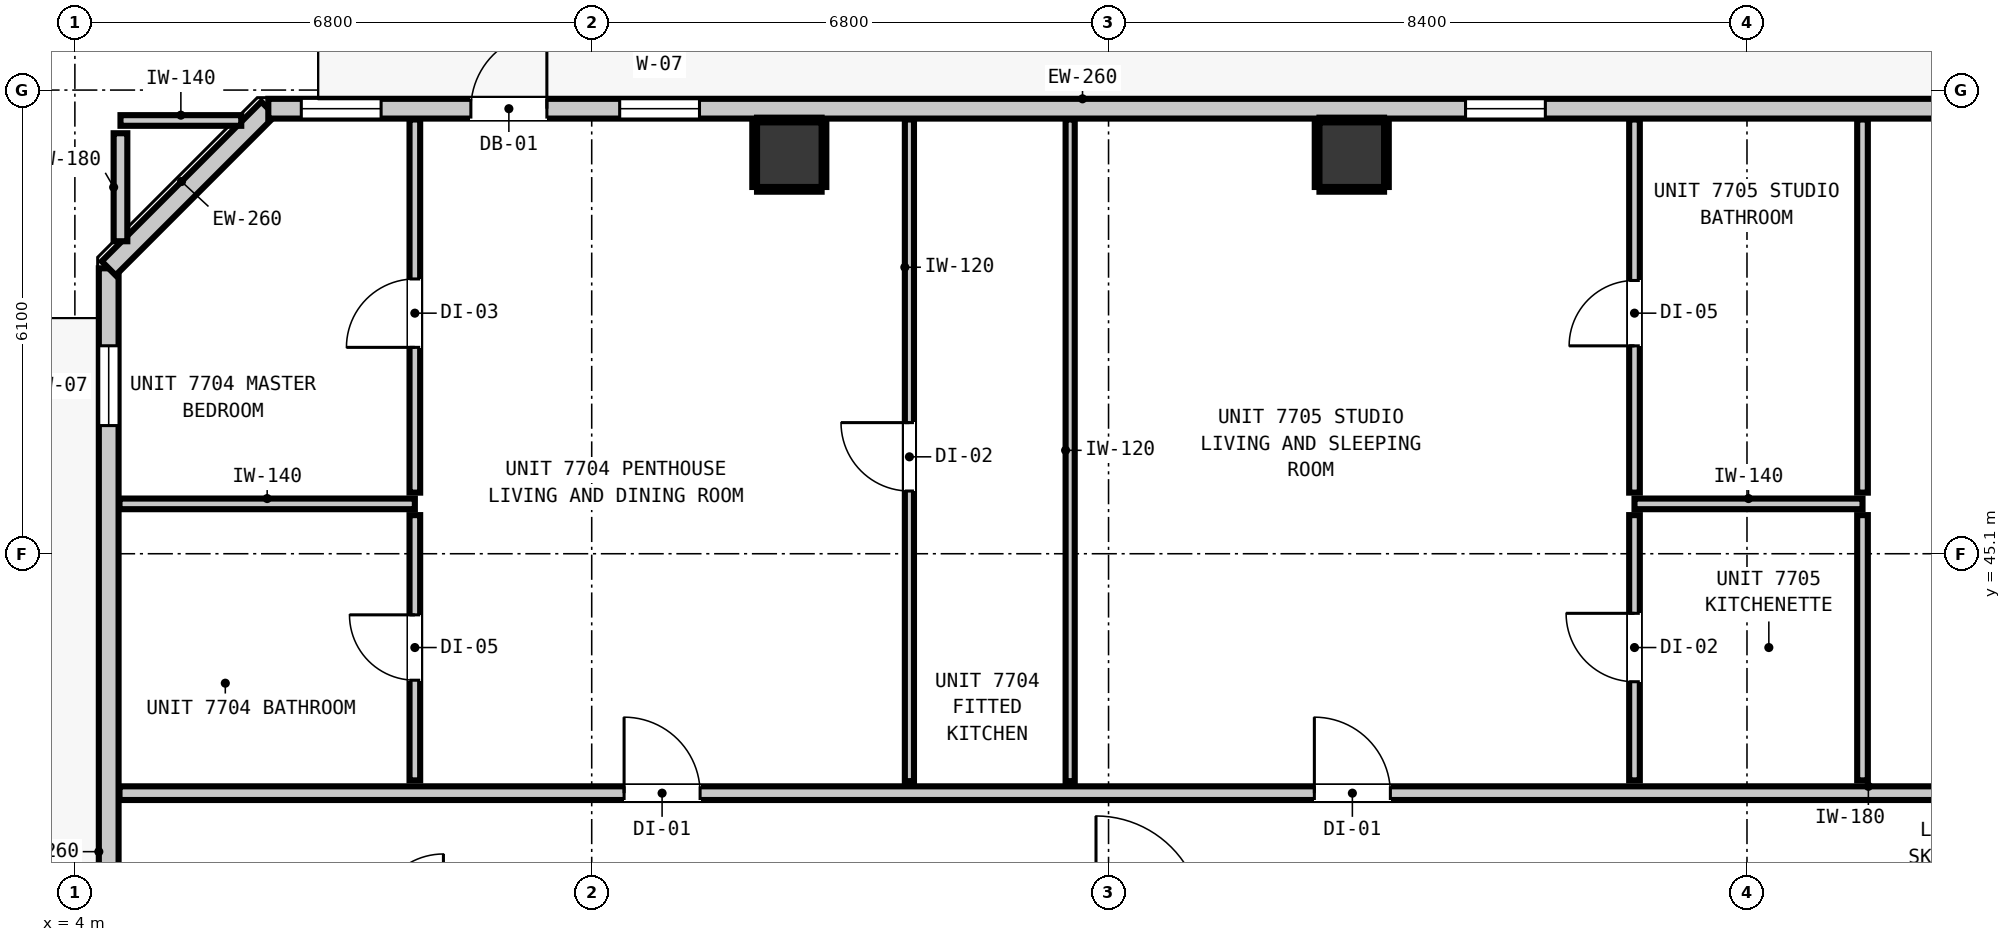
"""IFC4 building model, lengths in metres.
Left out: names, types, materials, properties, quantities, classifications, styles, units other than length and angle.
Written with IfcOpenShell. Run it as: python <this file> out.ifc"""

import sys

from ifc_helpers import new_model, si_unit, direction, frame, frame_2d, origin, origin_2d, place, context, subcontext, project, spatial, rectangle, extrude, element, fill, save


model = new_model("IFC4")
c1 = context("Model", 3, precision=1e-05, world=origin(), true_north=direction((0.0, 1.0)))
c2 = subcontext(c1, "Body", "Model", "MODEL_VIEW")
j1 = project(units=[si_unit("LENGTHUNIT", "METRE"), si_unit("PLANEANGLEUNIT", "RADIAN")], contexts=[c1])
p1 = place(None, origin())
s1 = spatial("IfcSite", under=j1, at=p1, CompositionType="ELEMENT")
p2 = place(p1, origin())
s2 = spatial("IfcBuilding", under=s1, at=p2, CompositionType="ELEMENT")
p3 = place(p2, frame((0.0, 0.0, 265.56)))
s3 = spatial("IfcBuildingStorey", under=s2, at=p3, CompositionType="ELEMENT", Elevation=265.56)
for number, where, z_axis, x_axis in (
    (1, (13.4, 50.35, 0.0), (0.0, 0.0, 1.0), (1.0, 0.0, 0.0)),
    (2, (20.8, 50.35, 0.0), (0.0, 0.0, 1.0), (1.0, 0.0, 0.0)),
):
    element("IfcColumn", number, at=place(p3, frame(where, z_axis=z_axis, x_axis=x_axis)), inside=s3, PredefinedType="COLUMN", context=c2, shape_type="SweptSolid", body=[
        extrude(rectangle(XDim=0.85, YDim=0.85, at=origin_2d()), origin(), (0.0, 0.0, 1.0), 3.32),
    ])
p4 = place(p3, frame((4.445, 18.545, 0.0), z_axis=(0.0, 0.0, 1.0), x_axis=(0.0, 1.0, 0.0)))
e3 = element("IfcWall", 3, at=p4, inside=s3, PredefinedType="STANDARD", context=c2, shape_type="SweptSolid", body=[
    extrude(rectangle(XDim=30.31, YDim=0.26, at=frame_2d((15.155, 0.0))), origin(), (0.0, 0.0, 1.0), 3.1),
])
p5 = place(p4, frame((4.434, 0.0, 0.0)))
e4 = element("IfcOpeningElement", 4, at=p5, cuts=e3, PredefinedType="OPENING", context=c2, shape_type="SweptSolid", body=[
    extrude(rectangle(XDim=1.0, YDim=2.15, at=frame_2d((0.5, 1.075))), frame((0.0, 0.14, 0.0), z_axis=(0.0, -1.0, 0.0), x_axis=(1.0, 0.0, 0.0)), (0.0, 0.0, 1.0), 0.28),
])
p6 = place(p4, frame((28.241, 0.0, 0.85)))
e5 = element("IfcOpeningElement", 5, at=p6, cuts=e3, PredefinedType="OPENING", context=c2, shape_type="SweptSolid", body=[
    extrude(rectangle(XDim=1.05, YDim=1.65, at=frame_2d((0.525, 0.825))), frame((0.0, 0.14, 0.0), z_axis=(0.0, -1.0, 0.0), x_axis=(1.0, 0.0, 0.0)), (0.0, 0.0, 1.0), 0.28),
])
p7 = place(p4, frame((15.98, 0.0, 0.85)))
e6 = element("IfcOpeningElement", 6, at=p7, cuts=e3, PredefinedType="OPENING", context=c2, shape_type="SweptSolid", body=[
    extrude(rectangle(XDim=1.05, YDim=1.65, at=frame_2d((0.525, 0.825))), frame((0.0, 0.14, 0.0), z_axis=(0.0, -1.0, 0.0), x_axis=(1.0, 0.0, 0.0)), (0.0, 0.0, 1.0), 0.28),
])
p8 = place(p3, frame((4.445, 48.855, 0.0), z_axis=(0.0, 0.0, 1.0), x_axis=(0.707065676302, 0.707147883682, 0.0)))
e7 = element("IfcWall", 7, at=p8, inside=s3, PredefinedType="STANDARD", context=c2, shape_type="SweptSolid", body=[
    extrude(rectangle(XDim=2.97, YDim=0.26, at=frame_2d((1.485, 0.0))), origin(), (0.0, 0.0, 1.0), 3.1),
])
p9 = place(p3, frame((6.545, 50.955, 0.0), z_axis=(0.0, 0.0, 1.0), x_axis=(1.0, 0.0, 0.0)))
e8 = element("IfcWall", 8, at=p9, inside=s3, PredefinedType="STANDARD", context=c2, shape_type="SweptSolid", body=[
    extrude(rectangle(XDim=32.71, YDim=0.26, at=frame_2d((16.355, 0.0))), origin(), (0.0, 0.0, 1.0), 3.1),
])
p10 = place(p9, frame((2.665, 0.0, 0.0)))
e9 = element("IfcOpeningElement", 9, at=p10, cuts=e8, PredefinedType="OPENING", context=c2, shape_type="SweptSolid", body=[
    extrude(rectangle(XDim=1.0, YDim=2.15, at=frame_2d((0.5, 1.075))), frame((0.0, 0.14, 0.0), z_axis=(0.0, -1.0, 0.0), x_axis=(1.0, 0.0, 0.0)), (0.0, 0.0, 1.0), 0.28),
])
p11 = place(p9, frame((4.623, 0.0, 0.85)))
e10 = element("IfcOpeningElement", 10, at=p11, cuts=e8, PredefinedType="OPENING", context=c2, shape_type="SweptSolid", body=[
    extrude(rectangle(XDim=1.05, YDim=1.65, at=frame_2d((0.525, 0.825))), frame((0.0, 0.14, 0.0), z_axis=(0.0, -1.0, 0.0), x_axis=(1.0, 0.0, 0.0)), (0.0, 0.0, 1.0), 0.28),
])
p12 = place(p9, frame((0.434, 0.0, 0.85)))
e11 = element("IfcOpeningElement", 11, at=p12, cuts=e8, PredefinedType="OPENING", context=c2, shape_type="SweptSolid", body=[
    extrude(rectangle(XDim=1.05, YDim=1.65, at=frame_2d((0.525, 0.825))), frame((0.0, 0.14, 0.0), z_axis=(0.0, -1.0, 0.0), x_axis=(1.0, 0.0, 0.0)), (0.0, 0.0, 1.0), 0.28),
])
p13 = place(p9, frame((15.752, 0.0, 0.85)))
e12 = element("IfcOpeningElement", 12, at=p13, cuts=e8, PredefinedType="OPENING", context=c2, shape_type="SweptSolid", body=[
    extrude(rectangle(XDim=1.05, YDim=1.65, at=frame_2d((0.525, 0.825))), frame((0.0, 0.14, 0.0), z_axis=(0.0, -1.0, 0.0), x_axis=(1.0, 0.0, 0.0)), (0.0, 0.0, 1.0), 0.28),
])
p14 = place(p9, frame((25.78, 0.0, 0.85)))
e13 = element("IfcOpeningElement", 13, at=p14, cuts=e8, PredefinedType="OPENING", context=c2, shape_type="SweptSolid", body=[
    extrude(rectangle(XDim=1.05, YDim=1.65, at=frame_2d((0.525, 0.825))), frame((0.0, 0.14, 0.0), z_axis=(0.0, -1.0, 0.0), x_axis=(1.0, 0.0, 0.0)), (0.0, 0.0, 1.0), 0.28),
])
p15 = place(p3, frame((4.587, 41.95, 0.0), z_axis=(0.0, 0.0, 1.0), x_axis=(1.0, 0.0, 0.0)))
e14 = element("IfcWall", 14, at=p15, inside=s3, PredefinedType="PARTITIONING", context=c2, shape_type="SweptSolid", body=[
    extrude(rectangle(XDim=36.626, YDim=0.18, at=frame_2d((18.313, 0.0))), origin(), (0.0, 0.0, 1.0), 3.1),
])
p16 = place(p15, frame((6.639, 0.0, 0.0)))
e15 = element("IfcOpeningElement", 15, at=p16, cuts=e14, PredefinedType="OPENING", context=c2, shape_type="SweptSolid", body=[
    extrude(rectangle(XDim=1.0, YDim=2.15, at=frame_2d((0.5, 1.075))), frame((0.0, 0.1, 0.0), z_axis=(0.0, -1.0, 0.0), x_axis=(1.0, 0.0, 0.0)), (0.0, 0.0, 1.0), 0.2),
])
p17 = place(p15, frame((15.721, 0.0, 0.0)))
e16 = element("IfcOpeningElement", 16, at=p17, cuts=e14, PredefinedType="OPENING", context=c2, shape_type="SweptSolid", body=[
    extrude(rectangle(XDim=1.0, YDim=2.15, at=frame_2d((0.5, 1.075))), frame((0.0, 0.1, 0.0), z_axis=(0.0, -1.0, 0.0), x_axis=(1.0, 0.0, 0.0)), (0.0, 0.0, 1.0), 0.2),
])
p18 = place(p15, frame((29.299, 0.0, 0.0)))
e17 = element("IfcOpeningElement", 17, at=p18, cuts=e14, PredefinedType="OPENING", context=c2, shape_type="SweptSolid", body=[
    extrude(rectangle(XDim=0.9, YDim=2.1, at=frame_2d((0.45, 1.05))), frame((0.0, 0.1, 0.0), z_axis=(0.0, -1.0, 0.0), x_axis=(1.0, 0.0, 0.0)), (0.0, 0.0, 1.0), 0.2),
])
p19 = place(p3, frame((4.587, 45.756, 0.0), z_axis=(0.0, 0.0, 1.0), x_axis=(1.0, 0.0, 0.0)))
e18 = element("IfcWall", 18, at=p19, inside=s3, PredefinedType="PARTITIONING", context=c2, shape_type="SweptSolid", body=[
    extrude(rectangle(XDim=3.886, YDim=0.14, at=frame_2d((1.943, 0.0))), origin(), (0.0, 0.0, 1.0), 3.1),
])
p20 = place(p3, frame((24.52, 45.756, 0.0), z_axis=(0.0, 0.0, 1.0), x_axis=(1.0, 0.0, 0.0)))
e19 = element("IfcWall", 19, at=p20, inside=s3, PredefinedType="PARTITIONING", context=c2, shape_type="SweptSolid", body=[
    extrude(rectangle(XDim=3.0, YDim=0.14, at=frame_2d((1.5, 0.0))), origin(), (0.0, 0.0, 1.0), 3.1),
])
p21 = place(p3, frame((4.6, 50.8, 0.0), z_axis=(0.0, 0.0, 1.0), x_axis=(1.0, 0.0, 0.0)))
e20 = element("IfcWall", 20, at=p21, inside=s3, PredefinedType="PARTITIONING", context=c2, shape_type="SweptSolid", body=[
    extrude(rectangle(XDim=1.589, YDim=0.14, at=frame_2d((0.794, 0.0))), origin(), (0.0, 0.0, 1.0), 3.1),
])
p22 = place(p3, frame((4.6, 49.211, 0.0), z_axis=(0.0, 0.0, 1.0), x_axis=(0.0, 1.0, 0.0)))
e21 = element("IfcWall", 21, at=p22, inside=s3, PredefinedType="PARTITIONING", context=c2, shape_type="SweptSolid", body=[
    extrude(rectangle(XDim=1.421, YDim=0.18, at=frame_2d((0.71, 0.0))), origin(), (0.0, 0.0, 1.0), 3.1),
])
p23 = place(p3, frame((8.473, 42.118, 0.0), z_axis=(0.0, 0.0, 1.0), x_axis=(0.0, 1.0, 0.0)))
e22 = element("IfcWall", 22, at=p23, inside=s3, PredefinedType="PARTITIONING", context=c2, shape_type="SweptSolid", body=[
    extrude(rectangle(XDim=3.49, YDim=0.14, at=frame_2d((1.745, 0.0))), origin(), (0.0, 0.0, 1.0), 3.1),
])
p24 = place(p23, frame((1.318, 0.0, 0.0)))
e23 = element("IfcOpeningElement", 23, at=p24, cuts=e22, PredefinedType="OPENING", context=c2, shape_type="SweptSolid", body=[
    extrude(rectangle(XDim=0.86, YDim=2.02, at=frame_2d((0.43, 1.01))), frame((0.0, 0.08, 0.0), z_axis=(0.0, -1.0, 0.0), x_axis=(1.0, 0.0, 0.0)), (0.0, 0.0, 1.0), 0.16),
])
p25 = place(p3, frame((8.473, 45.904, 0.0), z_axis=(0.0, 0.0, 1.0), x_axis=(0.0, 1.0, 0.0)))
e24 = element("IfcWall", 24, at=p25, inside=s3, PredefinedType="PARTITIONING", context=c2, shape_type="SweptSolid", body=[
    extrude(rectangle(XDim=4.909, YDim=0.14, at=frame_2d((2.455, 0.0))), origin(), (0.0, 0.0, 1.0), 3.1),
])
p26 = place(p25, frame((1.911, 0.0, 0.0)))
e25 = element("IfcOpeningElement", 25, at=p26, cuts=e24, PredefinedType="OPENING", context=c2, shape_type="SweptSolid", body=[
    extrude(rectangle(XDim=0.9, YDim=2.1, at=frame_2d((0.45, 1.05))), frame((0.0, 0.08, 0.0), z_axis=(0.0, -1.0, 0.0), x_axis=(1.0, 0.0, 0.0)), (0.0, 0.0, 1.0), 0.16),
])
p27 = place(p3, frame((24.52, 42.118, 0.0), z_axis=(0.0, 0.0, 1.0), x_axis=(0.0, 1.0, 0.0)))
e26 = element("IfcWall", 26, at=p27, inside=s3, PredefinedType="PARTITIONING", context=c2, shape_type="SweptSolid", body=[
    extrude(rectangle(XDim=3.49, YDim=0.14, at=frame_2d((1.745, 0.0))), origin(), (0.0, 0.0, 1.0), 3.1),
])
p28 = place(p27, frame((1.298, 0.0, 0.0)))
e27 = element("IfcOpeningElement", 27, at=p28, cuts=e26, PredefinedType="OPENING", context=c2, shape_type="SweptSolid", body=[
    extrude(rectangle(XDim=0.9, YDim=2.1, at=frame_2d((0.45, 1.05))), frame((0.0, 0.08, 0.0), z_axis=(0.0, -1.0, 0.0), x_axis=(1.0, 0.0, 0.0)), (0.0, 0.0, 1.0), 0.16),
])
p29 = place(p3, frame((24.52, 45.904, 0.0), z_axis=(0.0, 0.0, 1.0), x_axis=(0.0, 1.0, 0.0)))
e28 = element("IfcWall", 28, at=p29, inside=s3, PredefinedType="PARTITIONING", context=c2, shape_type="SweptSolid", body=[
    extrude(rectangle(XDim=4.909, YDim=0.14, at=frame_2d((2.455, 0.0))), origin(), (0.0, 0.0, 1.0), 3.1),
])
p30 = place(p29, frame((1.931, 0.0, 0.0)))
e29 = element("IfcOpeningElement", 29, at=p30, cuts=e28, PredefinedType="OPENING", context=c2, shape_type="SweptSolid", body=[
    extrude(rectangle(XDim=0.86, YDim=2.02, at=frame_2d((0.43, 1.01))), frame((0.0, 0.08, 0.0), z_axis=(0.0, -1.0, 0.0), x_axis=(1.0, 0.0, 0.0)), (0.0, 0.0, 1.0), 0.16),
])
p31 = place(p3, frame((27.52, 42.118, 0.0), z_axis=(0.0, 0.0, 1.0), x_axis=(0.0, 1.0, 0.0)))
e30 = element("IfcWall", 30, at=p31, inside=s3, PredefinedType="PARTITIONING", context=c2, shape_type="SweptSolid", body=[
    extrude(rectangle(XDim=3.49, YDim=0.14, at=frame_2d((1.745, 0.0))), origin(), (0.0, 0.0, 1.0), 3.1),
])
p32 = place(p3, frame((27.52, 45.904, 0.0), z_axis=(0.0, 0.0, 1.0), x_axis=(0.0, 1.0, 0.0)))
e31 = element("IfcWall", 31, at=p32, inside=s3, PredefinedType="PARTITIONING", context=c2, shape_type="SweptSolid", body=[
    extrude(rectangle(XDim=4.909, YDim=0.14, at=frame_2d((2.455, 0.0))), origin(), (0.0, 0.0, 1.0), 3.1),
])
p33 = place(p3, frame((14.98, 42.108, 0.0), z_axis=(0.0, 0.0, 1.0), x_axis=(0.0, 1.0, 0.0)))
e32 = element("IfcWall", 32, at=p33, inside=s3, PredefinedType="PARTITIONING", context=c2, shape_type="SweptSolid", body=[
    extrude(rectangle(XDim=8.705, YDim=0.12, at=frame_2d((4.353, 0.0))), origin(), (0.0, 0.0, 1.0), 3.1),
])
p34 = place(p33, frame((3.817, 0.0, 0.0)))
e33 = element("IfcOpeningElement", 33, at=p34, cuts=e32, PredefinedType="OPENING", context=c2, shape_type="SweptSolid", body=[
    extrude(rectangle(XDim=0.9, YDim=2.1, at=frame_2d((0.45, 1.05))), frame((0.0, 0.07, 0.0), z_axis=(0.0, -1.0, 0.0), x_axis=(1.0, 0.0, 0.0)), (0.0, 0.0, 1.0), 0.14),
])
p35 = place(p3, frame((17.095, 42.108, 0.0), z_axis=(0.0, 0.0, 1.0), x_axis=(0.0, 1.0, 0.0)))
e34 = element("IfcWall", 34, at=p35, inside=s3, PredefinedType="PARTITIONING", context=c2, shape_type="SweptSolid", body=[
    extrude(rectangle(XDim=8.705, YDim=0.12, at=frame_2d((4.353, 0.0))), origin(), (0.0, 0.0, 1.0), 3.1),
])
for number, where, z_axis, x_axis in (
    (35, (12.975, 49.893, 0.0), (0.0, 0.0, 1.0), (1.0, 0.0, 0.0)),
    (36, (12.975, 50.807, 0.0), (0.0, 0.0, 1.0), (1.0, 0.0, 0.0)),
    (37, (12.943, 49.925, 0.0), (0.0, 0.0, 1.0), (0.0, 1.0, 0.0)),
    (38, (13.857, 49.925, 0.0), (0.0, 0.0, 1.0), (0.0, 1.0, 0.0)),
):
    element("IfcWall", number, at=place(p3, frame(where, z_axis=z_axis, x_axis=x_axis)), inside=s3, PredefinedType="PARTITIONING", context=c2, shape_type="SweptSolid", body=[
        extrude(rectangle(XDim=0.85, YDim=0.06, at=frame_2d((0.425, 0.0))), origin(), (0.0, 0.0, 1.0), 1.45),
    ])
for number, where, z_axis, x_axis in (
    (39, (20.375, 49.893, 0.0), (0.0, 0.0, 1.0), (1.0, 0.0, 0.0)),
    (40, (20.375, 50.807, 0.0), (0.0, 0.0, 1.0), (1.0, 0.0, 0.0)),
):
    element("IfcWall", number, at=place(p3, frame(where, z_axis=z_axis, x_axis=x_axis)), inside=s3, PredefinedType="PARTITIONING", context=c2, shape_type="SweptSolid", body=[
        extrude(rectangle(XDim=0.85, YDim=0.06, at=frame_2d((0.425, 0.0))), origin(), (0.0, 0.0, 1.0), 1.45),
    ])
for number, where, z_axis, x_axis in (
    (41, (20.343, 49.925, 0.0), (0.0, 0.0, 1.0), (0.0, 1.0, 0.0)),
    (42, (21.257, 49.925, 0.0), (0.0, 0.0, 1.0), (0.0, 1.0, 0.0)),
):
    element("IfcWall", number, at=place(p3, frame(where, z_axis=z_axis, x_axis=x_axis)), inside=s3, PredefinedType="PARTITIONING", context=c2, shape_type="SweptSolid", body=[
        extrude(rectangle(XDim=0.85, YDim=0.06, at=frame_2d((0.425, 0.0))), origin(), (0.0, 0.0, 1.0), 1.45),
    ])
p36 = place(p10, origin())
e43 = element("IfcDoor", 43, at=p36, inside=s3, OperationType="SINGLE_SWING_RIGHT", PredefinedType="DOOR", context=c2, shape_type="SweptSolid", body=[
    extrude(rectangle(XDim=1.0, YDim=2.15, at=frame_2d((0.5, 1.075))), frame((0.0, 0.025, 0.0), z_axis=(0.0, -1.0, 0.0), x_axis=(1.0, 0.0, 0.0)), (0.0, 0.0, 1.0), 0.05),
])
fill(e9, e43)
p37 = place(p6, origin())
e44 = element("IfcWindow", 44, at=p37, inside=s3, PartitioningType="SINGLE_PANEL", PredefinedType="WINDOW", context=c2, shape_type="SweptSolid", body=[
    extrude(rectangle(XDim=1.05, YDim=1.65, at=frame_2d((0.525, 0.825))), frame((0.0, 0.03, 0.0), z_axis=(0.0, -1.0, 0.0), x_axis=(1.0, 0.0, 0.0)), (0.0, 0.0, 1.0), 0.06),
])
fill(e5, e44)
p38 = place(p11, origin())
e45 = element("IfcWindow", 45, at=p38, inside=s3, PartitioningType="SINGLE_PANEL", PredefinedType="WINDOW", context=c2, shape_type="SweptSolid", body=[
    extrude(rectangle(XDim=1.05, YDim=1.65, at=frame_2d((0.525, 0.825))), frame((0.0, 0.03, 0.0), z_axis=(0.0, -1.0, 0.0), x_axis=(1.0, 0.0, 0.0)), (0.0, 0.0, 1.0), 0.06),
])
fill(e10, e45)
p39 = place(p12, origin())
e46 = element("IfcWindow", 46, at=p39, inside=s3, PartitioningType="SINGLE_PANEL", PredefinedType="WINDOW", context=c2, shape_type="SweptSolid", body=[
    extrude(rectangle(XDim=1.05, YDim=1.65, at=frame_2d((0.525, 0.825))), frame((0.0, 0.03, 0.0), z_axis=(0.0, -1.0, 0.0), x_axis=(1.0, 0.0, 0.0)), (0.0, 0.0, 1.0), 0.06),
])
fill(e11, e46)
p40 = place(p13, origin())
e47 = element("IfcWindow", 47, at=p40, inside=s3, PartitioningType="SINGLE_PANEL", PredefinedType="WINDOW", context=c2, shape_type="SweptSolid", body=[
    extrude(rectangle(XDim=1.05, YDim=1.65, at=frame_2d((0.525, 0.825))), frame((0.0, 0.03, 0.0), z_axis=(0.0, -1.0, 0.0), x_axis=(1.0, 0.0, 0.0)), (0.0, 0.0, 1.0), 0.06),
])
fill(e12, e47)
p41 = place(p16, origin())
e48 = element("IfcDoor", 48, at=p41, inside=s3, OperationType="SINGLE_SWING_LEFT", PredefinedType="DOOR", context=c2, shape_type="SweptSolid", body=[
    extrude(rectangle(XDim=1.0, YDim=2.15, at=frame_2d((0.5, 1.075))), frame((0.0, 0.025, 0.0), z_axis=(0.0, -1.0, 0.0), x_axis=(1.0, 0.0, 0.0)), (0.0, 0.0, 1.0), 0.05),
])
fill(e15, e48)
p42 = place(p24, origin())
e49 = element("IfcDoor", 49, at=p42, inside=s3, OperationType="SINGLE_SWING_RIGHT", PredefinedType="DOOR", context=c2, shape_type="SweptSolid", body=[
    extrude(rectangle(XDim=0.86, YDim=2.02, at=frame_2d((0.43, 1.01))), frame((0.0, 0.025, 0.0), z_axis=(0.0, -1.0, 0.0), x_axis=(1.0, 0.0, 0.0)), (0.0, 0.0, 1.0), 0.05),
])
fill(e23, e49)
p43 = place(p26, origin())
e50 = element("IfcDoor", 50, at=p43, inside=s3, OperationType="SINGLE_SWING_LEFT", PredefinedType="DOOR", context=c2, shape_type="SweptSolid", body=[
    extrude(rectangle(XDim=0.9, YDim=2.1, at=frame_2d((0.45, 1.05))), frame((0.0, 0.025, 0.0), z_axis=(0.0, -1.0, 0.0), x_axis=(1.0, 0.0, 0.0)), (0.0, 0.0, 1.0), 0.05),
])
fill(e25, e50)
p44 = place(p34, origin())
e51 = element("IfcDoor", 51, at=p44, inside=s3, OperationType="SINGLE_SWING_RIGHT", PredefinedType="DOOR", context=c2, shape_type="SweptSolid", body=[
    extrude(rectangle(XDim=0.9, YDim=2.1, at=frame_2d((0.45, 1.05))), frame((0.0, 0.025, 0.0), z_axis=(0.0, -1.0, 0.0), x_axis=(1.0, 0.0, 0.0)), (0.0, 0.0, 1.0), 0.05),
])
fill(e33, e51)
p45 = place(p17, origin())
e52 = element("IfcDoor", 52, at=p45, inside=s3, OperationType="SINGLE_SWING_LEFT", PredefinedType="DOOR", context=c2, shape_type="SweptSolid", body=[
    extrude(rectangle(XDim=1.0, YDim=2.15, at=frame_2d((0.5, 1.075))), frame((0.0, 0.025, 0.0), z_axis=(0.0, -1.0, 0.0), x_axis=(1.0, 0.0, 0.0)), (0.0, 0.0, 1.0), 0.05),
])
fill(e16, e52)
p46 = place(p28, origin())
e53 = element("IfcDoor", 53, at=p46, inside=s3, OperationType="SINGLE_SWING_RIGHT", PredefinedType="DOOR", context=c2, shape_type="SweptSolid", body=[
    extrude(rectangle(XDim=0.9, YDim=2.1, at=frame_2d((0.45, 1.05))), frame((0.0, 0.025, 0.0), z_axis=(0.0, -1.0, 0.0), x_axis=(1.0, 0.0, 0.0)), (0.0, 0.0, 1.0), 0.05),
])
fill(e27, e53)
p47 = place(p30, origin())
e54 = element("IfcDoor", 54, at=p47, inside=s3, OperationType="SINGLE_SWING_LEFT", PredefinedType="DOOR", context=c2, shape_type="SweptSolid", body=[
    extrude(rectangle(XDim=0.86, YDim=2.02, at=frame_2d((0.43, 1.01))), frame((0.0, 0.025, 0.0), z_axis=(0.0, -1.0, 0.0), x_axis=(1.0, 0.0, 0.0)), (0.0, 0.0, 1.0), 0.05),
])
fill(e29, e54)
save(model, sys.argv[1])
